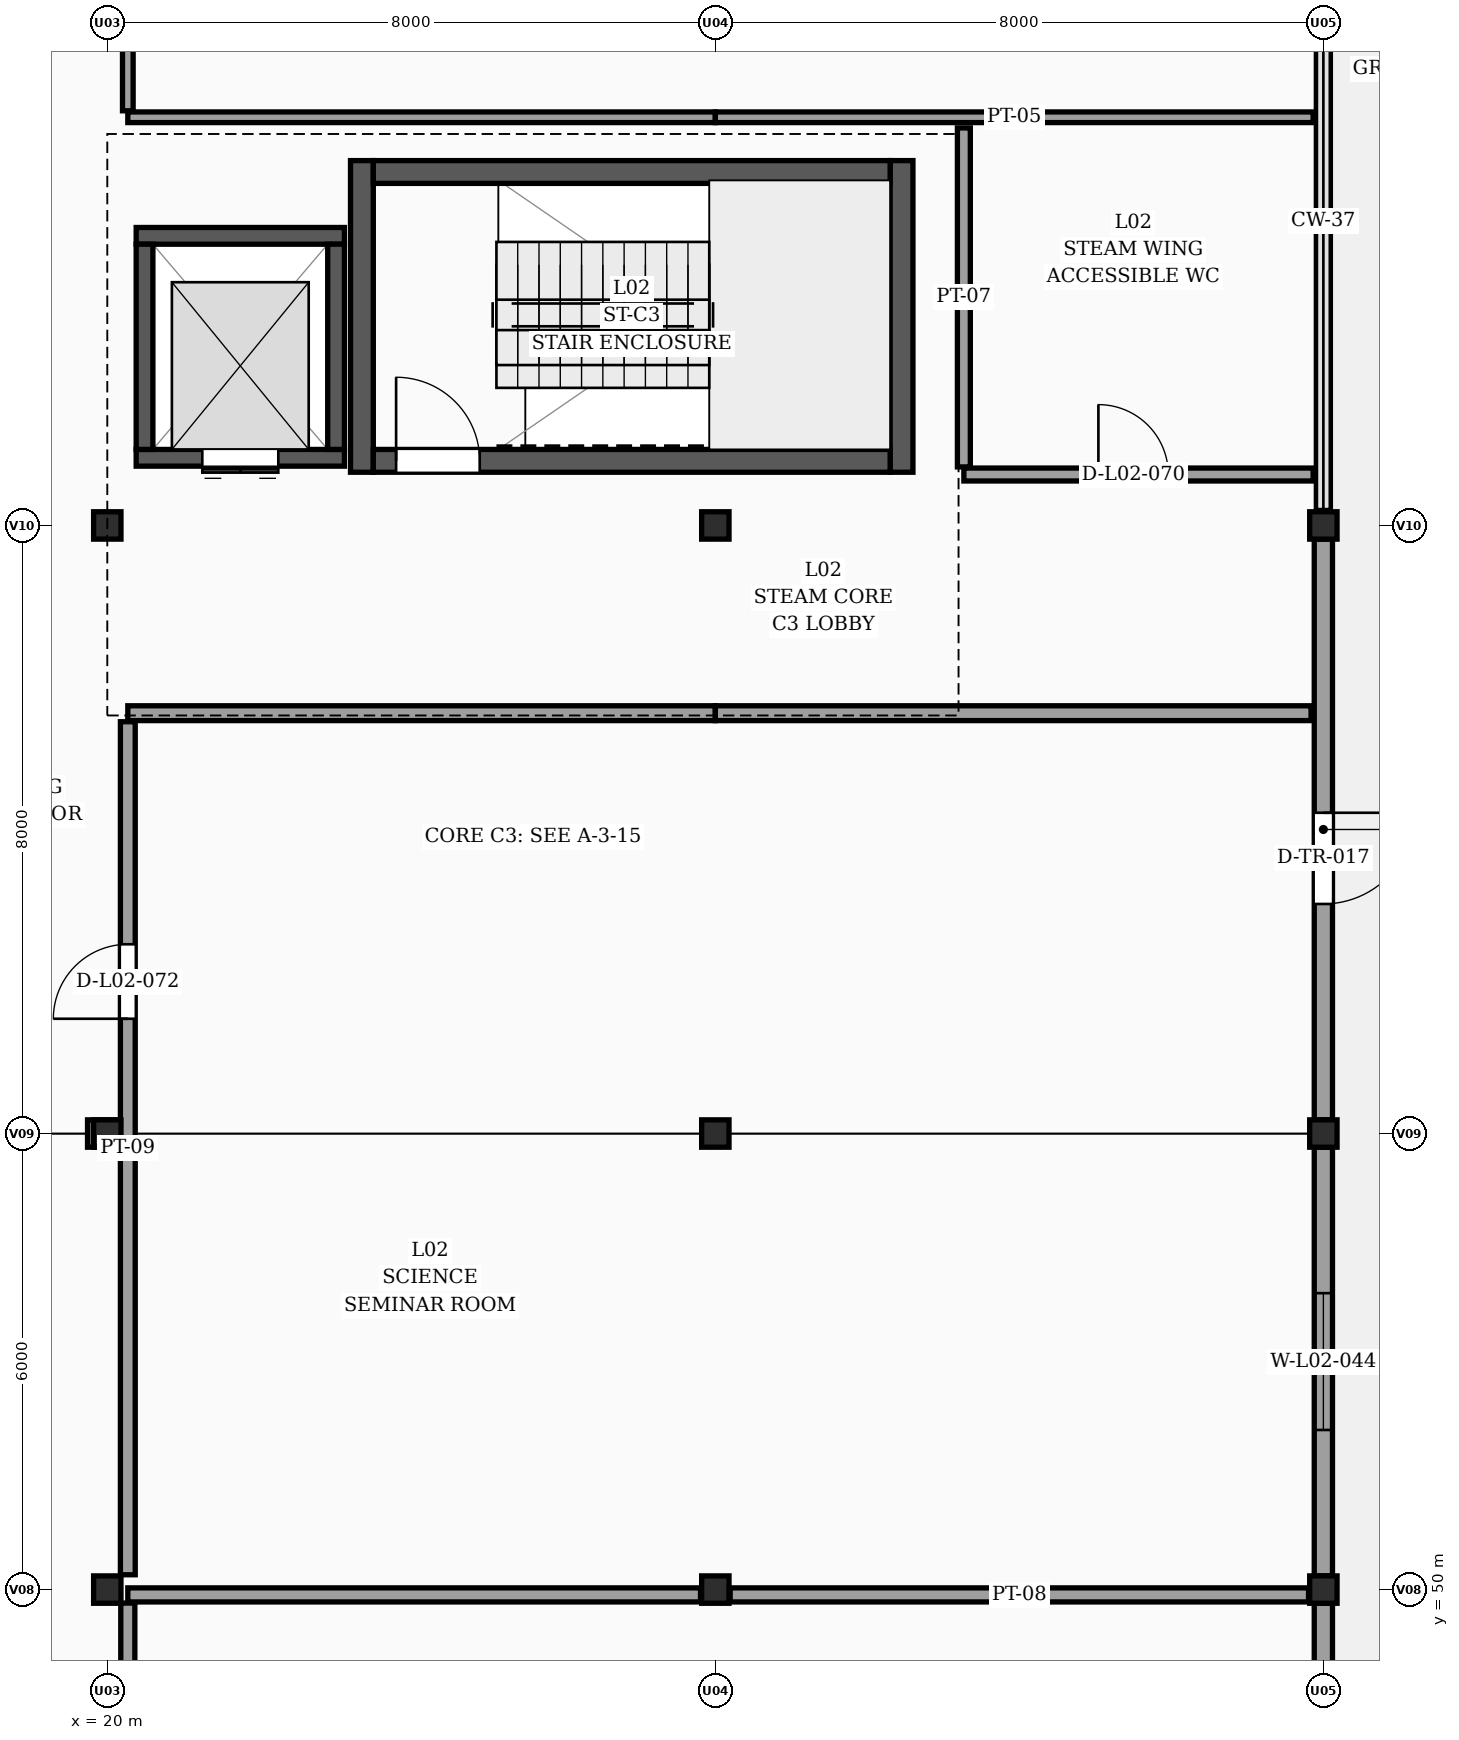
"""IFC4 building model, lengths in metres.
Left out: names, types, materials, properties, quantities, classifications, styles, units other than length and angle.
Written with IfcOpenShell. Run it as: python <this file> out.ifc"""

import sys

from ifc_helpers import new_model, si_unit, direction, frame, frame_2d, origin, origin_2d, place, context, subcontext, project, spatial, rectangle, extrude, element, fill, save


model = new_model("IFC4")
c1 = context("Model", 3, precision=1e-05, world=origin(), true_north=direction((0.0, 1.0)))
c2 = subcontext(c1, "Body", "Model", "MODEL_VIEW")
j1 = project(units=[si_unit("LENGTHUNIT", "METRE"), si_unit("PLANEANGLEUNIT", "RADIAN")], contexts=[c1])
p1 = place(None, origin())
s1 = spatial("IfcSite", under=j1, at=p1, CompositionType="ELEMENT")
p2 = place(p1, origin())
s2 = spatial("IfcBuilding", under=s1, at=p2, CompositionType="ELEMENT")
p3 = place(p2, frame((0.0, 0.0, 8.4)))
s3 = spatial("IfcBuildingStorey", under=s2, at=p3, CompositionType="ELEMENT", Elevation=8.4)
for number, where, z_axis, x_axis in (
    (1, (20.0, 50.0, 0.0), (0.0, 0.0, 1.0), (1.0, 0.0, 0.0)),
    (2, (20.0, 56.0, 0.0), (0.0, 0.0, 1.0), (1.0, 0.0, 0.0)),
    (3, (20.0, 64.0, 0.0), (0.0, 0.0, 1.0), (1.0, 0.0, 0.0)),
    (4, (28.0, 50.0, 0.0), (0.0, 0.0, 1.0), (1.0, 0.0, 0.0)),
    (5, (28.0, 56.0, 0.0), (0.0, 0.0, 1.0), (1.0, 0.0, 0.0)),
    (6, (28.0, 64.0, 0.0), (0.0, 0.0, 1.0), (1.0, 0.0, 0.0)),
    (7, (36.0, 50.0, 0.0), (0.0, 0.0, 1.0), (1.0, 0.0, 0.0)),
    (8, (36.0, 56.0, 0.0), (0.0, 0.0, 1.0), (1.0, 0.0, 0.0)),
    (9, (36.0, 64.0, 0.0), (0.0, 0.0, 1.0), (1.0, 0.0, 0.0)),
):
    element("IfcColumn", number, at=place(p3, frame(where, z_axis=z_axis, x_axis=x_axis)), inside=s3, PredefinedType="COLUMN", context=c2, shape_type="SweptSolid", body=[
        extrude(rectangle(XDim=0.36, YDim=0.36, at=origin_2d()), origin(), (0.0, 0.0, 1.0), 3.9),
    ])
p4 = place(p3, frame((36.0, 71.82, 0.0), z_axis=(0.0, 0.0, 1.0), x_axis=(0.0, -1.0, 0.0)))
e10 = element("IfcWall", 10, at=p4, inside=s3, PredefinedType="SOLIDWALL", context=c2, shape_type="SweptSolid", body=[
    extrude(rectangle(XDim=7.64, YDim=0.185, at=frame_2d((3.82, 0.0))), origin(), (0.0, 0.0, 1.0), 0.95),
])
p5 = place(p3, frame((36.0, 63.82, 0.0), z_axis=(0.0, 0.0, 1.0), x_axis=(0.0, -1.0, 0.0)))
e11 = element("IfcWall", 11, at=p5, inside=s3, PredefinedType="SOLIDWALL", context=c2, shape_type="SweptSolid", body=[
    extrude(rectangle(XDim=7.64, YDim=0.24, at=frame_2d((3.82, 0.0))), origin(), (0.0, 0.0, 1.0), 3.09),
])
p6 = place(p5, frame((3.6, 0.0, 0.0)))
e12 = element("IfcOpeningElement", 12, at=p6, cuts=e11, PredefinedType="OPENING", context=c2, shape_type="SweptSolid", body=[
    extrude(rectangle(XDim=1.2, YDim=2.15, at=frame_2d((0.6, 1.075))), frame((0.0, 0.13, 0.0), z_axis=(0.0, -1.0, 0.0), x_axis=(1.0, 0.0, 0.0)), (0.0, 0.0, 1.0), 0.26),
])
p7 = place(p3, frame((36.0, 55.82, 0.0), z_axis=(0.0, 0.0, 1.0), x_axis=(0.0, -1.0, 0.0)))
e13 = element("IfcWall", 13, at=p7, inside=s3, PredefinedType="SOLIDWALL", context=c2, shape_type="SweptSolid", body=[
    extrude(rectangle(XDim=5.64, YDim=0.24, at=frame_2d((2.82, 0.0))), origin(), (0.0, 0.0, 1.0), 3.088),
])
p8 = place(p7, frame((1.92, 0.0, 0.95)))
e14 = element("IfcOpeningElement", 14, at=p8, cuts=e13, PredefinedType="OPENING", context=c2, shape_type="SweptSolid", body=[
    extrude(rectangle(XDim=1.8, YDim=1.65, at=frame_2d((0.9, 0.825))), frame((0.0, 0.13, 0.0), z_axis=(0.0, -1.0, 0.0), x_axis=(1.0, 0.0, 0.0)), (0.0, 0.0, 1.0), 0.26),
])
p9 = place(p3, frame((36.0, 49.82, 0.0), z_axis=(0.0, 0.0, 1.0), x_axis=(0.0, -1.0, 0.0)))
e15 = element("IfcWall", 15, at=p9, inside=s3, PredefinedType="SOLIDWALL", context=c2, shape_type="SweptSolid", body=[
    extrude(rectangle(XDim=5.64, YDim=0.24, at=frame_2d((2.82, 0.0))), origin(), (0.0, 0.0, 1.0), 3.088),
])
p10 = place(p9, frame((1.82, 0.0, 0.95)))
e16 = element("IfcOpeningElement", 16, at=p10, cuts=e15, PredefinedType="OPENING", context=c2, shape_type="SweptSolid", body=[
    extrude(rectangle(XDim=2.0, YDim=1.65, at=frame_2d((1.0, 0.825))), frame((0.0, 0.13, 0.0), z_axis=(0.0, -1.0, 0.0), x_axis=(1.0, 0.0, 0.0)), (0.0, 0.0, 1.0), 0.26),
])
for number, where, z_axis, x_axis in (
    (17, (23.35, 64.7, 0.0), (0.0, 0.0, 1.0), (0.0, 1.0, 0.0)),
    (18, (30.45, 68.8, 0.0), (0.0, 0.0, 1.0), (0.0, -1.0, 0.0)),
):
    element("IfcWall", number, at=place(p3, frame(where, z_axis=z_axis, x_axis=x_axis)), inside=s3, PredefinedType="SHEAR", context=c2, shape_type="SweptSolid", body=[
        extrude(rectangle(XDim=4.1, YDim=0.3, at=frame_2d((2.05, 0.0))), origin(), (0.0, 0.0, 1.0), 3.65),
    ])
p11 = place(p3, frame((23.5, 64.85, 0.0), z_axis=(0.0, 0.0, 1.0), x_axis=(1.0, 0.0, 0.0)))
e19 = element("IfcWall", 19, at=p11, inside=s3, PredefinedType="SHEAR", context=c2, shape_type="SweptSolid", body=[
    extrude(rectangle(XDim=6.8, YDim=0.3, at=frame_2d((3.4, 0.0))), origin(), (0.0, 0.0, 1.0), 3.65),
])
p12 = place(p11, frame((0.3, 0.0, 0.0)))
e20 = element("IfcOpeningElement", 20, at=p12, cuts=e19, PredefinedType="OPENING", context=c2, shape_type="SweptSolid", body=[
    extrude(rectangle(XDim=1.1, YDim=2.15, at=frame_2d((0.55, 1.075))), frame((0.0, 0.16, 0.0), z_axis=(0.0, -1.0, 0.0), x_axis=(1.0, 0.0, 0.0)), (0.0, 0.0, 1.0), 0.32),
])
p13 = place(p3, frame((30.3, 68.65, 0.0), z_axis=(0.0, 0.0, 1.0), x_axis=(-1.0, 0.0, 0.0)))
e21 = element("IfcWall", 21, at=p13, inside=s3, PredefinedType="SHEAR", context=c2, shape_type="SweptSolid", body=[
    extrude(rectangle(XDim=6.8, YDim=0.3, at=frame_2d((3.4, 0.0))), origin(), (0.0, 0.0, 1.0), 3.65),
])
p14 = place(p3, frame((23.12, 64.89, 0.0), z_axis=(0.0, 0.0, 1.0), x_axis=(-1.0, 0.0, 0.0)))
e22 = element("IfcWall", 22, at=p14, inside=s3, PredefinedType="SHEAR", context=c2, shape_type="SweptSolid", body=[
    extrude(rectangle(XDim=2.74, YDim=0.22, at=frame_2d((1.37, 0.0))), origin(), (0.0, 0.0, 1.0), 3.65),
])
p15 = place(p14, frame((0.87, 0.0, 0.0)))
e23 = element("IfcOpeningElement", 23, at=p15, cuts=e22, PredefinedType="OPENING", context=c2, shape_type="SweptSolid", body=[
    extrude(rectangle(XDim=1.0, YDim=2.15, at=frame_2d((0.5, 1.075))), frame((0.0, 0.12, 0.0), z_axis=(0.0, -1.0, 0.0), x_axis=(1.0, 0.0, 0.0)), (0.0, 0.0, 1.0), 0.24),
])
p16 = place(p3, frame((20.38, 67.81, 0.0), z_axis=(0.0, 0.0, 1.0), x_axis=(1.0, 0.0, 0.0)))
e24 = element("IfcWall", 24, at=p16, inside=s3, PredefinedType="SHEAR", context=c2, shape_type="SweptSolid", body=[
    extrude(rectangle(XDim=2.74, YDim=0.22, at=frame_2d((1.37, 0.0))), origin(), (0.0, 0.0, 1.0), 3.65),
])
for number, where, z_axis, x_axis in (
    (25, (20.49, 65.0, 0.0), (0.0, 0.0, 1.0), (0.0, 1.0, 0.0)),
    (26, (23.01, 67.7, 0.0), (0.0, 0.0, 1.0), (0.0, -1.0, 0.0)),
):
    element("IfcWall", number, at=place(p3, frame(where, z_axis=z_axis, x_axis=x_axis)), inside=s3, PredefinedType="SHEAR", context=c2, shape_type="SweptSolid", body=[
        extrude(rectangle(XDim=2.7, YDim=0.22, at=frame_2d((1.35, 0.0))), origin(), (0.0, 0.0, 1.0), 3.65),
    ])
p17 = place(p3, frame((20.27, 69.37, 0.0), z_axis=(0.0, 0.0, 1.0), x_axis=(1.0, 0.0, 0.0)))
e27 = element("IfcWall", 27, at=p17, inside=s3, PredefinedType="PARTITIONING", context=c2, shape_type="SweptSolid", body=[
    extrude(rectangle(XDim=7.73, YDim=0.14, at=frame_2d((3.865, 0.0))), origin(), (0.0, 0.0, 1.0), 3.65),
])
p18 = place(p3, frame((28.0, 69.37, 0.0), z_axis=(0.0, 0.0, 1.0), x_axis=(1.0, 0.0, 0.0)))
e28 = element("IfcWall", 28, at=p18, inside=s3, PredefinedType="PARTITIONING", context=c2, shape_type="SweptSolid", body=[
    extrude(rectangle(XDim=7.865, YDim=0.14, at=frame_2d((3.933, 0.0))), origin(), (0.0, 0.0, 1.0), 3.65),
])
p19 = place(p3, frame((20.27, 69.455, 0.0), z_axis=(0.0, 0.0, 1.0), x_axis=(0.0, 1.0, 0.0)))
e29 = element("IfcWall", 29, at=p19, inside=s3, PredefinedType="PARTITIONING", context=c2, shape_type="SweptSolid", body=[
    extrude(rectangle(XDim=2.35, YDim=0.14, at=frame_2d((1.175, 0.0))), origin(), (0.0, 0.0, 1.0), 3.09),
])
p20 = place(p3, frame((31.27, 64.67, 0.0), z_axis=(0.0, 0.0, 1.0), x_axis=(1.0, 0.0, 0.0)))
e30 = element("IfcWall", 30, at=p20, inside=s3, PredefinedType="PARTITIONING", context=c2, shape_type="SweptSolid", body=[
    extrude(rectangle(XDim=4.595, YDim=0.17, at=frame_2d((2.298, 0.0))), origin(), (0.0, 0.0, 1.0), 3.65),
])
p21 = place(p20, frame((1.77, 0.0, 0.0)))
e31 = element("IfcOpeningElement", 31, at=p21, cuts=e30, PredefinedType="OPENING", context=c2, shape_type="SweptSolid", body=[
    extrude(rectangle(XDim=0.92, YDim=2.1, at=frame_2d((0.46, 1.05))), frame((0.0, 0.095, 0.0), z_axis=(0.0, -1.0, 0.0), x_axis=(1.0, 0.0, 0.0)), (0.0, 0.0, 1.0), 0.19),
])
p22 = place(p3, frame((31.27, 64.77, 0.0), z_axis=(0.0, 0.0, 1.0), x_axis=(0.0, 1.0, 0.0)))
e32 = element("IfcWall", 32, at=p22, inside=s3, PredefinedType="PARTITIONING", context=c2, shape_type="SweptSolid", body=[
    extrude(rectangle(XDim=4.46, YDim=0.17, at=frame_2d((2.23, 0.0))), origin(), (0.0, 0.0, 1.0), 3.65),
])
p23 = place(p3, frame((20.27, 49.93, 0.0), z_axis=(0.0, 0.0, 1.0), x_axis=(1.0, 0.0, 0.0)))
e33 = element("IfcWall", 33, at=p23, inside=s3, PredefinedType="PARTITIONING", context=c2, shape_type="SweptSolid", body=[
    extrude(rectangle(XDim=7.535, YDim=0.185, at=frame_2d((3.768, 0.0))), origin(), (0.0, 0.0, 1.0), 3.088),
])
p24 = place(p3, frame((28.195, 49.93, 0.0), z_axis=(0.0, 0.0, 1.0), x_axis=(1.0, 0.0, 0.0)))
e34 = element("IfcWall", 34, at=p24, inside=s3, PredefinedType="PARTITIONING", context=c2, shape_type="SweptSolid", body=[
    extrude(rectangle(XDim=7.61, YDim=0.185, at=frame_2d((3.805, 0.0))), origin(), (0.0, 0.0, 1.0), 3.088),
])
p25 = place(p3, frame((20.27, 44.162, 0.0), z_axis=(0.0, 0.0, 1.0), x_axis=(0.0, 1.0, 0.0)))
e35 = element("IfcWall", 35, at=p25, inside=s3, PredefinedType="PARTITIONING", context=c2, shape_type="SweptSolid", body=[
    extrude(rectangle(XDim=5.66, YDim=0.185, at=frame_2d((2.83, 0.0))), origin(), (0.0, 0.0, 1.0), 3.088),
])
p26 = place(p25, frame((2.363, 0.0, 0.0)))
e36 = element("IfcOpeningElement", 36, at=p26, cuts=e35, PredefinedType="OPENING", context=c2, shape_type="SweptSolid", body=[
    extrude(rectangle(XDim=0.95, YDim=2.1, at=frame_2d((0.475, 1.05))), frame((0.0, 0.103, 0.0), z_axis=(0.0, -1.0, 0.0), x_axis=(1.0, 0.0, 0.0)), (0.0, 0.0, 1.0), 0.205),
])
p27 = place(p3, frame((20.27, 61.53, 0.0), z_axis=(0.0, 0.0, 1.0), x_axis=(1.0, 0.0, 0.0)))
e37 = element("IfcWall", 37, at=p27, inside=s3, PredefinedType="PARTITIONING", context=c2, shape_type="SweptSolid", body=[
    extrude(rectangle(XDim=7.73, YDim=0.195, at=frame_2d((3.865, 0.0))), origin(), (0.0, 0.0, 1.0), 3.65),
])
p28 = place(p3, frame((28.0, 61.53, 0.0), z_axis=(0.0, 0.0, 1.0), x_axis=(1.0, 0.0, 0.0)))
e38 = element("IfcWall", 38, at=p28, inside=s3, PredefinedType="PARTITIONING", context=c2, shape_type="SweptSolid", body=[
    extrude(rectangle(XDim=7.838, YDim=0.195, at=frame_2d((3.919, 0.0))), origin(), (0.0, 0.0, 1.0), 3.65),
])
p29 = place(p3, frame((20.27, 50.195, 0.0), z_axis=(0.0, 0.0, 1.0), x_axis=(0.0, 1.0, 0.0)))
e39 = element("IfcWall", 39, at=p29, inside=s3, PredefinedType="PARTITIONING", context=c2, shape_type="SweptSolid", body=[
    extrude(rectangle(XDim=11.222, YDim=0.195, at=frame_2d((5.611, 0.0))), origin(), (0.0, 0.0, 1.0), 3.088),
])
p30 = place(p29, frame((7.315, 0.0, 0.0)))
e40 = element("IfcOpeningElement", 40, at=p30, cuts=e39, PredefinedType="OPENING", context=c2, shape_type="SweptSolid", body=[
    extrude(rectangle(XDim=0.98, YDim=2.1, at=frame_2d((0.49, 1.05))), frame((0.0, 0.107, 0.0), z_axis=(0.0, -1.0, 0.0), x_axis=(1.0, 0.0, 0.0)), (0.0, 0.0, 1.0), 0.215),
])
p31 = place(p6, origin())
e41 = element("IfcDoor", 41, at=p31, inside=s3, OperationType="SINGLE_SWING_LEFT", PredefinedType="DOOR", context=c2, shape_type="SweptSolid", body=[
    extrude(rectangle(XDim=1.2, YDim=2.15, at=frame_2d((0.6, 1.075))), frame((0.0, 0.025, 0.0), z_axis=(0.0, -1.0, 0.0), x_axis=(1.0, 0.0, 0.0)), (0.0, 0.0, 1.0), 0.05),
])
fill(e12, e41)
p32 = place(p8, origin())
e42 = element("IfcWindow", 42, at=p32, inside=s3, PartitioningType="DOUBLE_PANEL_VERTICAL", PredefinedType="WINDOW", context=c2, shape_type="SweptSolid", body=[
    extrude(rectangle(XDim=1.8, YDim=1.65, at=frame_2d((0.9, 0.825))), frame((0.0, 0.03, 0.0), z_axis=(0.0, -1.0, 0.0), x_axis=(1.0, 0.0, 0.0)), (0.0, 0.0, 1.0), 0.06),
])
fill(e14, e42)
p33 = place(p12, origin())
e43 = element("IfcDoor", 43, at=p33, inside=s3, OperationType="SINGLE_SWING_LEFT", PredefinedType="DOOR", context=c2, shape_type="SweptSolid", body=[
    extrude(rectangle(XDim=1.1, YDim=2.15, at=frame_2d((0.55, 1.075))), frame((0.0, 0.025, 0.0), z_axis=(0.0, -1.0, 0.0), x_axis=(1.0, 0.0, 0.0)), (0.0, 0.0, 1.0), 0.05),
])
fill(e20, e43)
p34 = place(p15, origin())
e44 = element("IfcDoor", 44, at=p34, inside=s3, OperationType="DOUBLE_DOOR_SLIDING", PredefinedType="DOOR", context=c2, shape_type="SweptSolid", body=[
    extrude(rectangle(XDim=1.0, YDim=2.15, at=frame_2d((0.5, 1.075))), frame((0.0, 0.025, 0.0), z_axis=(0.0, -1.0, 0.0), x_axis=(1.0, 0.0, 0.0)), (0.0, 0.0, 1.0), 0.05),
])
fill(e23, e44)
p35 = place(p21, origin())
e45 = element("IfcDoor", 45, at=p35, inside=s3, OperationType="SINGLE_SWING_LEFT", PredefinedType="DOOR", context=c2, shape_type="SweptSolid", body=[
    extrude(rectangle(XDim=0.92, YDim=2.1, at=frame_2d((0.46, 1.05))), frame((0.0, 0.025, 0.0), z_axis=(0.0, -1.0, 0.0), x_axis=(1.0, 0.0, 0.0)), (0.0, 0.0, 1.0), 0.05),
])
fill(e31, e45)
p36 = place(p30, origin())
e46 = element("IfcDoor", 46, at=p36, inside=s3, OperationType="SINGLE_SWING_LEFT", PredefinedType="DOOR", context=c2, shape_type="SweptSolid", body=[
    extrude(rectangle(XDim=0.98, YDim=2.1, at=frame_2d((0.49, 1.05))), frame((0.0, 0.025, 0.0), z_axis=(0.0, -1.0, 0.0), x_axis=(1.0, 0.0, 0.0)), (0.0, 0.0, 1.0), 0.05),
])
fill(e40, e46)
save(model, sys.argv[1])
